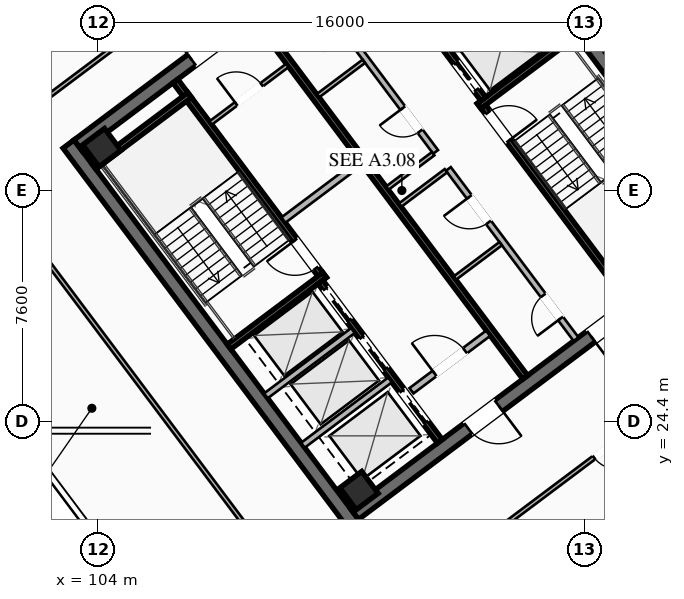
"""IFC4 building model, lengths in metres.
Left out: names, types, materials, properties, quantities, classifications, styles, units other than length and angle.
Written with IfcOpenShell. Run it as: python <this file> out.ifc"""

import sys

from ifc_helpers import new_model, si_unit, direction, frame, frame_2d, origin, origin_2d, place, context, subcontext, project, spatial, rectangle, hollow_rectangle, extrude, element, fill, save


model = new_model("IFC4")
c1 = context("Model", 3, precision=1e-05, world=origin(), true_north=direction((0.0, 1.0)))
c2 = subcontext(c1, "Body", "Model", "MODEL_VIEW")
j1 = project(units=[si_unit("LENGTHUNIT", "METRE"), si_unit("PLANEANGLEUNIT", "RADIAN")], contexts=[c1])
p1 = place(None, origin())
s1 = spatial("IfcSite", under=j1, at=p1, CompositionType="ELEMENT")
p2 = place(p1, origin())
s2 = spatial("IfcBuilding", under=s1, at=p2, CompositionType="ELEMENT")
p3 = place(p2, frame((0.0, 0.0, 251.4)))
s3 = spatial("IfcBuildingStorey", under=s2, at=p3, CompositionType="ELEMENT", Elevation=251.4)
for number, where, z_axis, x_axis in (
    (1, (112.396, 21.047, 0.0), (0.0, 0.0, 1.0), (-0.6, 0.8, 0.0)),
    (2, (115.604, 42.953, 0.0), (0.0, 0.0, 1.0), (0.6, -0.8, 0.0)),
):
    element("IfcWall", number, at=place(p3, frame(where, z_axis=z_axis, x_axis=x_axis)), inside=s3, PredefinedType="SHEAR", context=c2, shape_type="SweptSolid", body=[
        extrude(rectangle(XDim=15.6, YDim=0.45, at=frame_2d((7.8, 0.0))), origin(), (0.0, 0.0, 1.0), 4.0),
    ])
p4 = place(p3, frame((124.649, 30.518, 0.0), z_axis=(0.0, 0.0, 1.0), x_axis=(-0.8, -0.6, 0.0)))
e3 = element("IfcWall", 3, at=p4, inside=s3, PredefinedType="SHEAR", context=c2, shape_type="SweptSolid", body=[
    extrude(rectangle(XDim=15.26, YDim=0.45, at=frame_2d((7.63, 0.0))), origin(), (0.0, 0.0, 1.0), 4.0),
])
p5 = place(p4, frame((9.33, 0.0, 0.0)))
e4 = element("IfcOpeningElement", 4, at=p5, cuts=e3, PredefinedType="OPENING", context=c2, shape_type="SweptSolid", body=[
    extrude(rectangle(XDim=1.25, YDim=2.25, at=frame_2d((0.625, 1.125))), frame((0.0, 0.235, 0.0), z_axis=(0.0, -1.0, 0.0), x_axis=(1.0, 0.0, 0.0)), (0.0, 0.0, 1.0), 0.47),
])
p6 = place(p4, frame((4.28, 0.0, 0.0)))
e5 = element("IfcOpeningElement", 5, at=p6, cuts=e3, PredefinedType="OPENING", context=c2, shape_type="SweptSolid", body=[
    extrude(rectangle(XDim=1.25, YDim=2.25, at=frame_2d((0.625, 1.125))), frame((0.0, 0.235, 0.0), z_axis=(0.0, -1.0, 0.0), x_axis=(1.0, 0.0, 0.0)), (0.0, 0.0, 1.0), 0.47),
])
p7 = place(p3, frame((103.351, 33.482, 0.0), z_axis=(0.0, 0.0, 1.0), x_axis=(0.8, 0.6, 0.0)))
e6 = element("IfcWall", 6, at=p7, inside=s3, PredefinedType="SHEAR", context=c2, shape_type="SweptSolid", body=[
    extrude(rectangle(XDim=15.26, YDim=0.45, at=frame_2d((7.63, 0.0))), origin(), (0.0, 0.0, 1.0), 4.0),
])
p8 = place(p7, frame((4.68, 0.0, 0.0)))
e7 = element("IfcOpeningElement", 7, at=p8, cuts=e6, PredefinedType="OPENING", context=c2, shape_type="SweptSolid", body=[
    extrude(rectangle(XDim=1.25, YDim=2.25, at=frame_2d((0.625, 1.125))), frame((0.0, 0.235, 0.0), z_axis=(0.0, -1.0, 0.0), x_axis=(1.0, 0.0, 0.0)), (0.0, 0.0, 1.0), 0.47),
])
p9 = place(p7, frame((9.73, 0.0, 0.0)))
e8 = element("IfcOpeningElement", 8, at=p9, cuts=e6, PredefinedType="OPENING", context=c2, shape_type="SweptSolid", body=[
    extrude(rectangle(XDim=1.25, YDim=2.25, at=frame_2d((0.625, 1.125))), frame((0.0, 0.235, 0.0), z_axis=(0.0, -1.0, 0.0), x_axis=(1.0, 0.0, 0.0)), (0.0, 0.0, 1.0), 0.47),
])
for number, where, z_axis, x_axis in (
    (9, (112.59, 22.13, 0.0), (0.0, 0.0, 1.0), (0.8, 0.6, 0.0)),
    (10, (104.13, 33.41, 0.0), (0.0, 0.0, 1.0), (0.8, 0.6, 0.0)),
):
    element("IfcColumn", number, at=place(p3, frame(where, z_axis=z_axis, x_axis=x_axis)), inside=s3, PredefinedType="COLUMN", context=c2, shape_type="SweptSolid", body=[
        extrude(hollow_rectangle(XDim=0.9, YDim=0.9, WallThickness=0.04, at=origin_2d()), origin(), (0.0, 0.0, 1.0), 3.78),
    ])
p10 = place(p3, frame((111.44, 29.08, 0.0), z_axis=(0.0, 0.0, 1.0), x_axis=(-0.59999041401, 0.800007189403, 0.0)))
e11 = element("IfcWall", 11, at=p10, inside=s3, PredefinedType="SHEAR", context=c2, shape_type="SweptSolid", body=[
    extrude(rectangle(XDim=8.15, YDim=0.2, at=frame_2d((4.075, 0.0))), origin(), (0.0, 0.0, 1.0), 3.78),
])
p11 = place(p10, frame((0.45, 0.0, 0.0)))
e12 = element("IfcOpeningElement", 12, at=p11, cuts=e11, PredefinedType="OPENING", context=c2, shape_type="SweptSolid", body=[
    extrude(rectangle(XDim=1.15, YDim=2.2, at=frame_2d((0.575, 1.1))), frame((0.0, 0.11, 0.0), z_axis=(0.0, -1.0, 0.0), x_axis=(1.0, 0.0, 0.0)), (0.0, 0.0, 1.0), 0.22),
])
for number, where, z_axis, x_axis in (
    (13, (108.316, 26.862, 0.0), (0.0, 0.0, 1.0), (0.8, 0.6, 0.0)),
    (14, (103.876, 32.782, 0.0), (0.0, 0.0, 1.0), (0.8, 0.6, 0.0)),
):
    element("IfcWall", number, at=place(p3, frame(where, z_axis=z_axis, x_axis=x_axis)), inside=s3, PredefinedType="SHEAR", context=c2, shape_type="SweptSolid", body=[
        extrude(rectangle(XDim=3.93, YDim=0.2, at=frame_2d((1.965, 0.0))), origin(), (0.0, 0.0, 1.0), 3.78),
    ])
p12 = place(p3, frame((116.56, 34.92, 0.0), z_axis=(0.0, 0.0, 1.0), x_axis=(0.59999041401, -0.800007189403, 0.0)))
e15 = element("IfcWall", 15, at=p12, inside=s3, PredefinedType="SHEAR", context=c2, shape_type="SweptSolid", body=[
    extrude(rectangle(XDim=8.15, YDim=0.2, at=frame_2d((4.075, 0.0))), origin(), (0.0, 0.0, 1.0), 3.78),
])
p13 = place(p12, frame((0.45, 0.0, 0.0)))
e16 = element("IfcOpeningElement", 16, at=p13, cuts=e15, PredefinedType="OPENING", context=c2, shape_type="SweptSolid", body=[
    extrude(rectangle(XDim=1.15, YDim=2.2, at=frame_2d((0.575, 1.1))), frame((0.0, 0.11, 0.0), z_axis=(0.0, -1.0, 0.0), x_axis=(1.0, 0.0, 0.0)), (0.0, 0.0, 1.0), 0.22),
])
p14 = place(p3, frame((116.54, 34.78, 0.0), z_axis=(0.0, 0.0, 1.0), x_axis=(0.800014909178, 0.599980120581, 0.0)))
e17 = element("IfcWall", 17, at=p14, inside=s3, PredefinedType="SHEAR", context=c2, shape_type="SweptSolid", body=[
    extrude(rectangle(XDim=3.93, YDim=0.2, at=frame_2d((1.965, 0.0))), origin(), (0.0, 0.0, 1.0), 3.78),
])
p15 = place(p3, frame((118.058, 25.856, 0.0), z_axis=(0.0, 0.0, 1.0), x_axis=(-0.600002657301, 0.799998007018, 0.0)))
e18 = element("IfcWall", 18, at=p15, inside=s3, PredefinedType="SHEAR", context=c2, shape_type="SweptSolid", body=[
    extrude(rectangle(XDim=14.7, YDim=0.2, at=frame_2d((7.35, 0.0))), origin(), (0.0, 0.0, 1.0), 3.78),
])
p16 = place(p3, frame((110.104, 31.028, 0.0), z_axis=(0.0, 0.0, 1.0), x_axis=(0.800018601094, 0.59997519774, 0.0)))
e19 = element("IfcWall", 19, at=p16, inside=s3, PredefinedType="SOLIDWALL", context=c2, shape_type="SweptSolid", body=[
    extrude(rectangle(XDim=3.15, YDim=0.22, at=frame_2d((1.575, 0.0))), origin(), (0.0, 0.0, 1.0), 2.971),
])
p17 = place(p3, frame((114.316, 25.412, 0.0), z_axis=(0.0, 0.0, 1.0), x_axis=(0.800018601094, 0.59997519774, 0.0)))
e20 = element("IfcWall", 20, at=p17, inside=s3, PredefinedType="SOLIDWALL", context=c2, shape_type="SweptSolid", body=[
    extrude(rectangle(XDim=3.15, YDim=0.22, at=frame_2d((1.575, 0.0))), origin(), (0.0, 0.0, 1.0), 2.971),
])
p18 = place(p17, frame((0.95, 0.0, 0.0)))
e21 = element("IfcOpeningElement", 21, at=p18, cuts=e20, PredefinedType="OPENING", context=c2, shape_type="SweptSolid", body=[
    extrude(rectangle(XDim=1.25, YDim=2.25, at=frame_2d((0.625, 1.125))), frame((0.0, 0.12, 0.0), z_axis=(0.0, -1.0, 0.0), x_axis=(1.0, 0.0, 0.0)), (0.0, 0.0, 1.0), 0.24),
])
p19 = place(p3, frame((115.25, 23.75, 0.0), z_axis=(0.0, 0.0, 1.0), x_axis=(-0.599994036198, 0.800004472816, 0.0)))
e22 = element("IfcWall", 22, at=p19, inside=s3, PredefinedType="SHEAR", context=c2, shape_type="SweptSolid", body=[
    extrude(rectangle(XDim=6.55, YDim=0.2, at=frame_2d((3.275, 0.0))), origin(), (0.0, 0.0, 1.0), 3.78),
])
p20 = place(p19, frame((4.975, 0.0, 0.0)))
e23 = element("IfcOpeningElement", 23, at=p20, cuts=e22, PredefinedType="OPENING", context=c2, shape_type="SweptSolid", body=[
    extrude(rectangle(XDim=1.3, YDim=2.25, at=frame_2d((0.65, 1.125))), frame((0.0, 0.11, 0.0), z_axis=(0.0, -1.0, 0.0), x_axis=(1.0, 0.0, 0.0)), (0.0, 0.0, 1.0), 0.22),
])
p21 = place(p19, frame((2.975, 0.0, 0.0)))
e24 = element("IfcOpeningElement", 24, at=p21, cuts=e22, PredefinedType="OPENING", context=c2, shape_type="SweptSolid", body=[
    extrude(rectangle(XDim=1.3, YDim=2.25, at=frame_2d((0.65, 1.125))), frame((0.0, 0.11, 0.0), z_axis=(0.0, -1.0, 0.0), x_axis=(1.0, 0.0, 0.0)), (0.0, 0.0, 1.0), 0.22),
])
p22 = place(p19, frame((0.775, 0.0, 0.0)))
e25 = element("IfcOpeningElement", 25, at=p22, cuts=e22, PredefinedType="OPENING", context=c2, shape_type="SweptSolid", body=[
    extrude(rectangle(XDim=1.3, YDim=2.25, at=frame_2d((0.65, 1.125))), frame((0.0, 0.11, 0.0), z_axis=(0.0, -1.0, 0.0), x_axis=(1.0, 0.0, 0.0)), (0.0, 0.0, 1.0), 0.22),
])
for number, where, z_axis, x_axis in (
    (26, (110.746, 23.622, 0.0), (0.0, 0.0, 1.0), (0.8, 0.6, 0.0)),
    (27, (109.528, 25.246, 0.0), (0.0, 0.0, 1.0), (0.8, 0.6, 0.0)),
):
    element("IfcWall", number, at=place(p3, frame(where, z_axis=z_axis, x_axis=x_axis)), inside=s3, PredefinedType="SOLIDWALL", context=c2, shape_type="SweptSolid", body=[
        extrude(rectangle(XDim=3.58, YDim=0.2, at=frame_2d((1.79, 0.0))), origin(), (0.0, 0.0, 1.0), 3.78),
    ])
p23 = place(p3, frame((112.75, 40.25, 0.0), z_axis=(0.0, 0.0, 1.0), x_axis=(0.599994036198, -0.800004472816, 0.0)))
e28 = element("IfcWall", 28, at=p23, inside=s3, PredefinedType="SHEAR", context=c2, shape_type="SweptSolid", body=[
    extrude(rectangle(XDim=6.55, YDim=0.2, at=frame_2d((3.275, 0.0))), origin(), (0.0, 0.0, 1.0), 3.78),
])
p24 = place(p23, frame((5.075, 0.0, 0.0)))
e29 = element("IfcOpeningElement", 29, at=p24, cuts=e28, PredefinedType="OPENING", context=c2, shape_type="SweptSolid", body=[
    extrude(rectangle(XDim=1.1, YDim=2.2, at=frame_2d((0.55, 1.1))), frame((0.0, 0.11, 0.0), z_axis=(0.0, -1.0, 0.0), x_axis=(1.0, 0.0, 0.0)), (0.0, 0.0, 1.0), 0.22),
])
p25 = place(p23, frame((3.025, 0.0, 0.0)))
e30 = element("IfcOpeningElement", 30, at=p25, cuts=e28, PredefinedType="OPENING", context=c2, shape_type="SweptSolid", body=[
    extrude(rectangle(XDim=1.1, YDim=2.2, at=frame_2d((0.55, 1.1))), frame((0.0, 0.11, 0.0), z_axis=(0.0, -1.0, 0.0), x_axis=(1.0, 0.0, 0.0)), (0.0, 0.0, 1.0), 0.22),
])
p26 = place(p23, frame((1.025, 0.0, 0.0)))
e31 = element("IfcOpeningElement", 31, at=p26, cuts=e28, PredefinedType="OPENING", context=c2, shape_type="SweptSolid", body=[
    extrude(rectangle(XDim=1.1, YDim=2.2, at=frame_2d((0.55, 1.1))), frame((0.0, 0.11, 0.0), z_axis=(0.0, -1.0, 0.0), x_axis=(1.0, 0.0, 0.0)), (0.0, 0.0, 1.0), 0.22),
])
p27 = place(p3, frame((107.71, 34.22, 0.0), z_axis=(0.0, 0.0, 1.0), x_axis=(0.799981399002, 0.60002480053, 0.0)))
e32 = element("IfcWall", 32, at=p27, inside=s3, PredefinedType="PARTITIONING", context=c2, shape_type="SweptSolid", body=[
    extrude(rectangle(XDim=3.15, YDim=0.135, at=frame_2d((1.575, 0.0))), origin(), (0.0, 0.0, 1.0), 2.971),
])
p28 = place(p27, frame((1.05, 0.0, 0.0)))
e33 = element("IfcOpeningElement", 33, at=p28, cuts=e32, PredefinedType="OPENING", context=c2, shape_type="SweptSolid", body=[
    extrude(rectangle(XDim=1.05, YDim=2.2, at=frame_2d((0.525, 1.1))), frame((0.0, 0.077, 0.0), z_axis=(0.0, -1.0, 0.0), x_axis=(1.0, 0.0, 0.0)), (0.0, 0.0, 1.0), 0.155),
])
p29 = place(p3, frame((119.73, 27.11, 0.0), z_axis=(0.0, 0.0, 1.0), x_axis=(-0.600005580459, 0.799995814625, 0.0)))
e34 = element("IfcWall", 34, at=p29, inside=s3, PredefinedType="SOLIDWALL", context=c2, shape_type="SweptSolid", body=[
    extrude(rectangle(XDim=7.0, YDim=0.2, at=frame_2d((3.5, 0.0))), origin(), (0.0, 0.0, 1.0), 2.971),
])
p30 = place(p29, frame((0.85, 0.0, 0.0)))
e35 = element("IfcOpeningElement", 35, at=p30, cuts=e34, PredefinedType="OPENING", context=c2, shape_type="SweptSolid", body=[
    extrude(rectangle(XDim=0.95, YDim=2.05, at=frame_2d((0.475, 1.025))), frame((0.0, 0.11, 0.0), z_axis=(0.0, -1.0, 0.0), x_axis=(1.0, 0.0, 0.0)), (0.0, 0.0, 1.0), 0.22),
])
p31 = place(p29, frame((4.8, 0.0, 0.0)))
e36 = element("IfcOpeningElement", 36, at=p31, cuts=e34, PredefinedType="OPENING", context=c2, shape_type="SweptSolid", body=[
    extrude(rectangle(XDim=1.05, YDim=2.2, at=frame_2d((0.525, 1.1))), frame((0.0, 0.11, 0.0), z_axis=(0.0, -1.0, 0.0), x_axis=(1.0, 0.0, 0.0)), (0.0, 0.0, 1.0), 0.22),
])
for number, where, z_axis, x_axis in (
    (37, (113.946, 31.522, 0.0), (0.0, 0.0, 1.0), (0.8, 0.6, 0.0)),
    (38, (115.746, 29.122, 0.0), (0.0, 0.0, 1.0), (0.8, 0.6, 0.0)),
):
    element("IfcWall", number, at=place(p3, frame(where, z_axis=z_axis, x_axis=x_axis)), inside=s3, PredefinedType="PARTITIONING", context=c2, shape_type="SweptSolid", body=[
        extrude(rectangle(XDim=1.88, YDim=0.135, at=frame_2d((0.94, 0.0))), origin(), (0.0, 0.0, 1.0), 2.971),
    ])
p32 = place(p3, frame((115.11, 33.27, 0.0), z_axis=(0.0, 0.0, 1.0), x_axis=(-0.600011160345, 0.79999162962, 0.0)))
e39 = element("IfcWall", 39, at=p32, inside=s3, PredefinedType="SOLIDWALL", context=c2, shape_type="SweptSolid", body=[
    extrude(rectangle(XDim=7.0, YDim=0.2, at=frame_2d((3.5, 0.0))), origin(), (0.0, 0.0, 1.0), 2.971),
])
p33 = place(p32, frame((0.85, 0.0, 0.0)))
e40 = element("IfcOpeningElement", 40, at=p33, cuts=e39, PredefinedType="OPENING", context=c2, shape_type="SweptSolid", body=[
    extrude(rectangle(XDim=0.95, YDim=2.05, at=frame_2d((0.475, 1.025))), frame((0.0, 0.11, 0.0), z_axis=(0.0, -1.0, 0.0), x_axis=(1.0, 0.0, 0.0)), (0.0, 0.0, 1.0), 0.22),
])
p34 = place(p32, frame((4.85, 0.0, 0.0)))
e41 = element("IfcOpeningElement", 41, at=p34, cuts=e39, PredefinedType="OPENING", context=c2, shape_type="SweptSolid", body=[
    extrude(rectangle(XDim=0.95, YDim=2.05, at=frame_2d((0.475, 1.025))), frame((0.0, 0.11, 0.0), z_axis=(0.0, -1.0, 0.0), x_axis=(1.0, 0.0, 0.0)), (0.0, 0.0, 1.0), 0.22),
])
p35 = place(p3, frame((113.526, 32.082, 0.0), z_axis=(0.0, 0.0, 1.0), x_axis=(0.800046745961, 0.599937666993, 0.0)))
e42 = element("IfcWall", 42, at=p35, inside=s3, PredefinedType="PARTITIONING", context=c2, shape_type="SweptSolid", body=[
    extrude(rectangle(XDim=1.88, YDim=0.135, at=frame_2d((0.94, 0.0))), origin(), (0.0, 0.0, 1.0), 2.971),
])
p36 = place(p3, frame((111.246, 35.122, 0.0), z_axis=(0.0, 0.0, 1.0), x_axis=(0.8, 0.6, 0.0)))
e43 = element("IfcWall", 43, at=p36, inside=s3, PredefinedType="PARTITIONING", context=c2, shape_type="SweptSolid", body=[
    extrude(rectangle(XDim=1.88, YDim=0.135, at=frame_2d((0.94, 0.0))), origin(), (0.0, 0.0, 1.0), 2.971),
])
p37 = place(p3, frame((99.746, 33.122, 0.0), z_axis=(0.0, 0.0, 1.0), x_axis=(0.800001242445, 0.599998343403, 0.0)))
e44 = element("IfcWall", 44, at=p37, inside=s3, PredefinedType="PARTITIONING", context=c2, shape_type="SweptSolid", body=[
    extrude(rectangle(XDim=23.58, YDim=0.135, at=frame_2d((11.79, 0.0))), origin(), (0.0, 0.0, 1.0), 2.971),
])
p38 = place(p37, frame((0.3, 0.0, 0.0)))
e45 = element("IfcOpeningElement", 45, at=p38, cuts=e44, PredefinedType="OPENING", context=c2, shape_type="SweptSolid", body=[
    extrude(rectangle(XDim=0.95, YDim=2.05, at=frame_2d((0.475, 1.025))), frame((0.0, 0.077, 0.0), z_axis=(0.0, -1.0, 0.0), x_axis=(1.0, 0.0, 0.0)), (0.0, 0.0, 1.0), 0.155),
])
p39 = place(p37, frame((22.33, 0.0, 0.0)))
e46 = element("IfcOpeningElement", 46, at=p39, cuts=e44, PredefinedType="OPENING", context=c2, shape_type="SweptSolid", body=[
    extrude(rectangle(XDim=0.95, YDim=2.05, at=frame_2d((0.475, 1.025))), frame((0.0, 0.077, 0.0), z_axis=(0.0, -1.0, 0.0), x_axis=(1.0, 0.0, 0.0)), (0.0, 0.0, 1.0), 0.155),
])
p40 = place(p3, frame((124.012, 25.984, 0.0), z_axis=(0.0, 0.0, 1.0), x_axis=(-0.800003872688, -0.599994836382, 0.0)))
e47 = element("IfcWall", 47, at=p40, inside=s3, PredefinedType="PARTITIONING", context=c2, shape_type="SweptSolid", body=[
    extrude(rectangle(XDim=15.13, YDim=0.135, at=frame_2d((7.565, 0.0))), origin(), (0.0, 0.0, 1.0), 2.971),
])
p41 = place(p40, frame((13.8, 0.0, 0.0)))
e48 = element("IfcOpeningElement", 48, at=p41, cuts=e47, PredefinedType="OPENING", context=c2, shape_type="SweptSolid", body=[
    extrude(rectangle(XDim=0.95, YDim=2.05, at=frame_2d((0.475, 1.025))), frame((0.0, 0.077, 0.0), z_axis=(0.0, -1.0, 0.0), x_axis=(1.0, 0.0, 0.0)), (0.0, 0.0, 1.0), 0.155),
])
p42 = place(p40, frame((3.663, 0.0, 0.0)))
e49 = element("IfcOpeningElement", 49, at=p42, cuts=e47, PredefinedType="OPENING", context=c2, shape_type="SweptSolid", body=[
    extrude(rectangle(XDim=0.95, YDim=2.05, at=frame_2d((0.475, 1.025))), frame((0.0, 0.077, 0.0), z_axis=(0.0, -1.0, 0.0), x_axis=(1.0, 0.0, 0.0)), (0.0, 0.0, 1.0), 0.155),
])
p43 = place(p3, frame((111.86, 16.97, 0.0), z_axis=(0.0, 0.0, 1.0), x_axis=(-0.60000194242, 0.799998543181, 0.0)))
e50 = element("IfcWall", 50, at=p43, inside=s3, PredefinedType="PARTITIONING", context=c2, shape_type="SweptSolid", body=[
    extrude(rectangle(XDim=20.11, YDim=0.135, at=frame_2d((10.055, 0.0))), origin(), (0.0, 0.0, 1.0), 2.971),
])
p44 = place(p43, frame((0.3, 0.0, 0.0)))
e51 = element("IfcOpeningElement", 51, at=p44, cuts=e50, PredefinedType="OPENING", context=c2, shape_type="SweptSolid", body=[
    extrude(rectangle(XDim=0.95, YDim=2.05, at=frame_2d((0.475, 1.025))), frame((0.0, 0.077, 0.0), z_axis=(0.0, -1.0, 0.0), x_axis=(1.0, 0.0, 0.0)), (0.0, 0.0, 1.0), 0.155),
])
p45 = place(p8, origin())
e52 = element("IfcDoor", 52, at=p45, inside=s3, OperationType="SINGLE_SWING_LEFT", PredefinedType="DOOR", context=c2, shape_type="SweptSolid", body=[
    extrude(rectangle(XDim=1.25, YDim=2.25, at=frame_2d((0.625, 1.125))), frame((0.0, 0.025, 0.0), z_axis=(0.0, -1.0, 0.0), x_axis=(1.0, 0.0, 0.0)), (0.0, 0.0, 1.0), 0.05),
])
fill(e7, e52)
p46 = place(p5, origin())
e53 = element("IfcDoor", 53, at=p46, inside=s3, OperationType="SINGLE_SWING_LEFT", PredefinedType="DOOR", context=c2, shape_type="SweptSolid", body=[
    extrude(rectangle(XDim=1.25, YDim=2.25, at=frame_2d((0.625, 1.125))), frame((0.0, 0.025, 0.0), z_axis=(0.0, -1.0, 0.0), x_axis=(1.0, 0.0, 0.0)), (0.0, 0.0, 1.0), 0.05),
])
fill(e4, e53)
p47 = place(p6, origin())
e54 = element("IfcDoor", 54, at=p47, inside=s3, OperationType="SINGLE_SWING_RIGHT", PredefinedType="DOOR", context=c2, shape_type="SweptSolid", body=[
    extrude(rectangle(XDim=1.25, YDim=2.25, at=frame_2d((0.625, 1.125))), frame((0.0, 0.025, 0.0), z_axis=(0.0, -1.0, 0.0), x_axis=(1.0, 0.0, 0.0)), (0.0, 0.0, 1.0), 0.05),
])
fill(e5, e54)
p48 = place(p11, origin())
e55 = element("IfcDoor", 55, at=p48, inside=s3, OperationType="SINGLE_SWING_RIGHT", PredefinedType="DOOR", context=c2, shape_type="SweptSolid", body=[
    extrude(rectangle(XDim=1.15, YDim=2.2, at=frame_2d((0.575, 1.1))), frame((0.0, 0.025, 0.0), z_axis=(0.0, -1.0, 0.0), x_axis=(1.0, 0.0, 0.0)), (0.0, 0.0, 1.0), 0.05),
])
fill(e12, e55)
p49 = place(p13, origin())
e56 = element("IfcDoor", 56, at=p49, inside=s3, OperationType="SINGLE_SWING_RIGHT", PredefinedType="DOOR", context=c2, shape_type="SweptSolid", body=[
    extrude(rectangle(XDim=1.15, YDim=2.2, at=frame_2d((0.575, 1.1))), frame((0.0, 0.025, 0.0), z_axis=(0.0, -1.0, 0.0), x_axis=(1.0, 0.0, 0.0)), (0.0, 0.0, 1.0), 0.05),
])
fill(e16, e56)
p50 = place(p18, origin())
e57 = element("IfcDoor", 57, at=p50, inside=s3, OperationType="SINGLE_SWING_LEFT", PredefinedType="DOOR", context=c2, shape_type="SweptSolid", body=[
    extrude(rectangle(XDim=1.25, YDim=2.25, at=frame_2d((0.625, 1.125))), frame((0.0, 0.025, 0.0), z_axis=(0.0, -1.0, 0.0), x_axis=(1.0, 0.0, 0.0)), (0.0, 0.0, 1.0), 0.05),
])
fill(e21, e57)
p51 = place(p28, origin())
e58 = element("IfcDoor", 58, at=p51, inside=s3, OperationType="SINGLE_SWING_LEFT", PredefinedType="DOOR", context=c2, shape_type="SweptSolid", body=[
    extrude(rectangle(XDim=1.05, YDim=2.2, at=frame_2d((0.525, 1.1))), frame((0.0, 0.025, 0.0), z_axis=(0.0, -1.0, 0.0), x_axis=(1.0, 0.0, 0.0)), (0.0, 0.0, 1.0), 0.05),
])
fill(e33, e58)
p52 = place(p30, origin())
e59 = element("IfcDoor", 59, at=p52, inside=s3, OperationType="SINGLE_SWING_LEFT", PredefinedType="DOOR", context=c2, shape_type="SweptSolid", body=[
    extrude(rectangle(XDim=0.95, YDim=2.05, at=frame_2d((0.475, 1.025))), frame((0.0, 0.025, 0.0), z_axis=(0.0, -1.0, 0.0), x_axis=(1.0, 0.0, 0.0)), (0.0, 0.0, 1.0), 0.05),
])
fill(e35, e59)
p53 = place(p31, origin())
e60 = element("IfcDoor", 60, at=p53, inside=s3, OperationType="SINGLE_SWING_RIGHT", PredefinedType="DOOR", context=c2, shape_type="SweptSolid", body=[
    extrude(rectangle(XDim=1.05, YDim=2.2, at=frame_2d((0.525, 1.1))), frame((0.0, 0.025, 0.0), z_axis=(0.0, -1.0, 0.0), x_axis=(1.0, 0.0, 0.0)), (0.0, 0.0, 1.0), 0.05),
])
fill(e36, e60)
p54 = place(p33, origin())
e61 = element("IfcDoor", 61, at=p54, inside=s3, OperationType="SINGLE_SWING_RIGHT", PredefinedType="DOOR", context=c2, shape_type="SweptSolid", body=[
    extrude(rectangle(XDim=0.95, YDim=2.05, at=frame_2d((0.475, 1.025))), frame((0.0, 0.025, 0.0), z_axis=(0.0, -1.0, 0.0), x_axis=(1.0, 0.0, 0.0)), (0.0, 0.0, 1.0), 0.05),
])
fill(e40, e61)
p55 = place(p42, origin())
e62 = element("IfcDoor", 62, at=p55, inside=s3, OperationType="SINGLE_SWING_LEFT", PredefinedType="DOOR", context=c2, shape_type="SweptSolid", body=[
    extrude(rectangle(XDim=0.95, YDim=2.05, at=frame_2d((0.475, 1.025))), frame((0.0, 0.025, 0.0), z_axis=(0.0, -1.0, 0.0), x_axis=(1.0, 0.0, 0.0)), (0.0, 0.0, 1.0), 0.05),
])
fill(e49, e62)
p56 = place(p20, origin())
e63 = element("IfcDoor", 63, at=p56, inside=s3, OperationType="SLIDING_TO_LEFT", PredefinedType="DOOR", context=c2, shape_type="SweptSolid", body=[
    extrude(rectangle(XDim=1.3, YDim=2.25, at=frame_2d((0.65, 1.125))), frame((0.0, 0.025, 0.0), z_axis=(0.0, -1.0, 0.0), x_axis=(1.0, 0.0, 0.0)), (0.0, 0.0, 1.0), 0.05),
])
fill(e23, e63)
p57 = place(p21, origin())
e64 = element("IfcDoor", 64, at=p57, inside=s3, OperationType="SLIDING_TO_LEFT", PredefinedType="DOOR", context=c2, shape_type="SweptSolid", body=[
    extrude(rectangle(XDim=1.3, YDim=2.25, at=frame_2d((0.65, 1.125))), frame((0.0, 0.025, 0.0), z_axis=(0.0, -1.0, 0.0), x_axis=(1.0, 0.0, 0.0)), (0.0, 0.0, 1.0), 0.05),
])
fill(e24, e64)
p58 = place(p22, origin())
e65 = element("IfcDoor", 65, at=p58, inside=s3, OperationType="SLIDING_TO_LEFT", PredefinedType="DOOR", context=c2, shape_type="SweptSolid", body=[
    extrude(rectangle(XDim=1.3, YDim=2.25, at=frame_2d((0.65, 1.125))), frame((0.0, 0.025, 0.0), z_axis=(0.0, -1.0, 0.0), x_axis=(1.0, 0.0, 0.0)), (0.0, 0.0, 1.0), 0.05),
])
fill(e25, e65)
p59 = place(p24, origin())
e66 = element("IfcDoor", 66, at=p59, inside=s3, OperationType="SLIDING_TO_LEFT", PredefinedType="DOOR", context=c2, shape_type="SweptSolid", body=[
    extrude(rectangle(XDim=1.1, YDim=2.2, at=frame_2d((0.55, 1.1))), frame((0.0, 0.025, 0.0), z_axis=(0.0, -1.0, 0.0), x_axis=(1.0, 0.0, 0.0)), (0.0, 0.0, 1.0), 0.05),
])
fill(e29, e66)
save(model, sys.argv[1])
